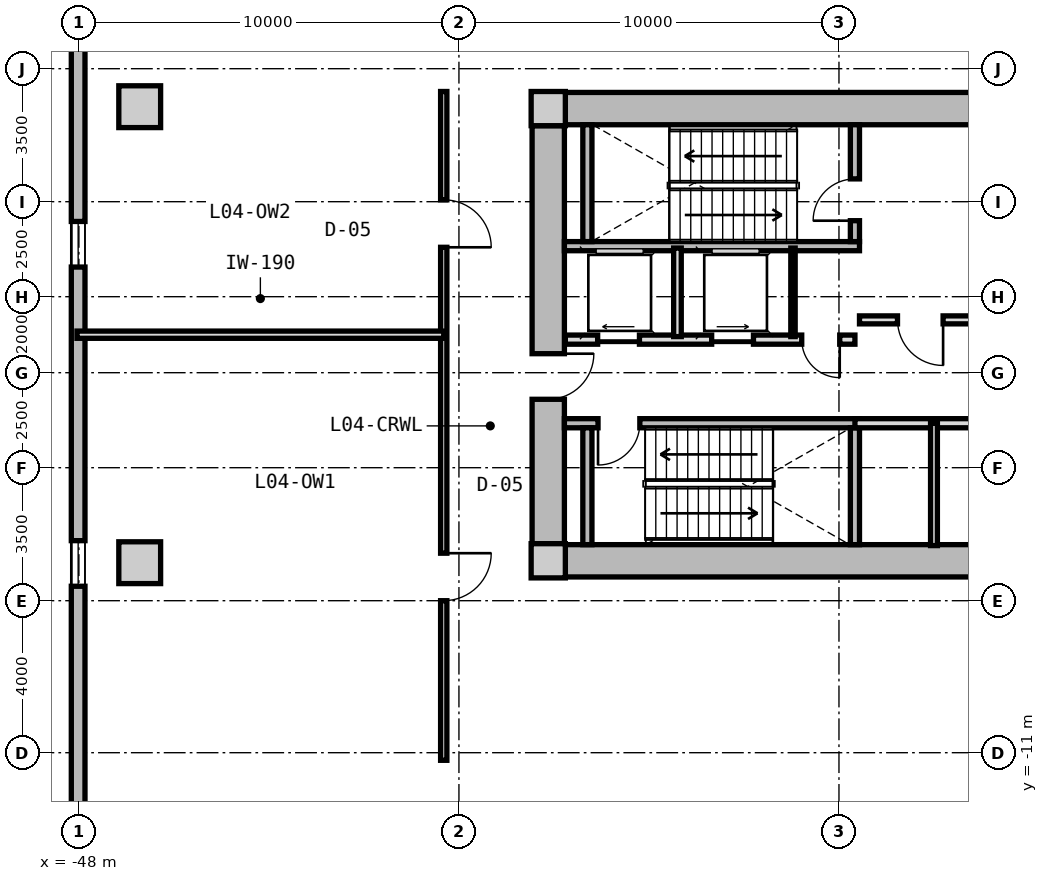
"""IFC4 building model, lengths in metres.
Left out: names, types, materials, properties, quantities, classifications, styles, units other than length and angle.
Written with IfcOpenShell. Run it as: python <this file> out.ifc"""

import sys

from ifc_helpers import new_model, si_unit, direction, frame, frame_2d, origin, origin_2d, place, context, subcontext, project, spatial, rectangle, extrude, source, transform, mapped, element, fill, save


model = new_model("IFC4")
c1 = context("Model", 3, precision=1e-05, world=origin(), true_north=direction((0.0, 1.0)))
c2 = subcontext(c1, "Body", "Model", "MODEL_VIEW")
j1 = project(units=[si_unit("LENGTHUNIT", "METRE"), si_unit("PLANEANGLEUNIT", "RADIAN")], contexts=[c1])
p1 = place(None, origin())
s1 = spatial("IfcSite", under=j1, at=p1, CompositionType="ELEMENT")
p2 = place(p1, origin())
s2 = spatial("IfcBuilding", under=s1, at=p2, CompositionType="ELEMENT")
p3 = place(p2, frame((0.0, 0.0, 16.8)))
s3 = spatial("IfcBuildingStorey", under=s2, at=p3, CompositionType="ELEMENT", Elevation=16.8)
m1 = source(origin(), c2, "Body", "SweptSolid", [
    extrude(rectangle(XDim=0.9, YDim=0.9, at=origin_2d()), origin(), (0.0, 0.0, 1.0), 4.8),
])
for number, where, z_axis, x_axis in (
    (1, (-35.65, -5.95, 0.0), (0.0, 0.0, 1.0), (1.0, 0.0, 0.0)),
    (2, (-35.65, 5.95, 0.0), (0.0, 0.0, 1.0), (1.0, 0.0, 0.0)),
):
    element("IfcColumn", number, at=place(p3, frame(where, z_axis=z_axis, x_axis=x_axis)), inside=s3, PredefinedType="COLUMN", context=c2, shape_type="MappedRepresentation", body=[
        mapped(m1, transform((0.0, 0.0, 0.0), x_axis=(1.0, 0.0, 0.0), y_axis=(0.0, 1.0, 0.0), z_axis=(0.0, 0.0, 1.0), scale=1.0)),
    ])
m2 = source(origin(), c2, "Body", "SweptSolid", [
    extrude(rectangle(XDim=14.4, YDim=0.85, at=frame_2d((7.2, 0.0))), origin(), (0.0, 0.0, 1.0), 4.38),
])
for number, where, z_axis, x_axis in (
    (3, (-35.2, 5.95, 0.0), (0.0, 0.0, 1.0), (1.0, 0.0, 0.0)),
    (4, (-20.8, -5.95, 0.0), (0.0, 0.0, 1.0), (-1.0, 0.0, 0.0)),
):
    element("IfcWall", number, at=place(p3, frame(where, z_axis=z_axis, x_axis=x_axis)), inside=s3, PredefinedType="SHEAR", context=c2, shape_type="MappedRepresentation", body=[
        mapped(m2, transform((0.0, 0.0, 0.0), x_axis=(1.0, 0.0, 0.0), y_axis=(0.0, 1.0, 0.0), z_axis=(0.0, 0.0, 1.0), scale=1.0)),
    ])
m3 = source(origin(), c2, "Body", "SweptSolid", [
    extrude(rectangle(XDim=11.0, YDim=0.85, at=frame_2d((5.5, 0.0))), origin(), (0.0, 0.0, 1.0), 4.38),
])
p4 = place(p3, frame((-35.65, -5.5, 0.0), z_axis=(0.0, 0.0, 1.0), x_axis=(0.0, 1.0, 0.0)))
e5 = element("IfcWall", 5, at=p4, inside=s3, PredefinedType="SHEAR", context=c2, shape_type="MappedRepresentation", body=[
    mapped(m3, transform((0.0, 0.0, 0.0), x_axis=(1.0, 0.0, 0.0), y_axis=(0.0, 1.0, 0.0), z_axis=(0.0, 0.0, 1.0), scale=1.0)),
])
p5 = place(p4, frame((3.8, 0.0, 0.0)))
e6 = element("IfcOpeningElement", 6, at=p5, cuts=e5, PredefinedType="OPENING", context=c2, shape_type="SweptSolid", body=[
    extrude(rectangle(XDim=1.2, YDim=2.15, at=frame_2d((0.6, 1.075))), frame((0.0, 0.435, 0.0), z_axis=(0.0, -1.0, 0.0), x_axis=(1.0, 0.0, 0.0)), (0.0, 0.0, 1.0), 0.87),
])
m4 = source(origin(), c2, "Body", "SweptSolid", [
    extrude(rectangle(XDim=1.1, YDim=1.1, at=origin_2d()), origin(), (0.0, 0.0, 1.0), 4.38),
])
for number, where, z_axis, x_axis in (
    (7, (-46.4, -6.0, 0.0), (0.0, 0.0, 1.0), (1.0, 0.0, 0.0)),
    (8, (-46.4, 6.0, 0.0), (0.0, 0.0, 1.0), (1.0, 0.0, 0.0)),
):
    element("IfcColumn", number, at=place(p3, frame(where, z_axis=z_axis, x_axis=x_axis)), inside=s3, PredefinedType="COLUMN", context=c2, shape_type="MappedRepresentation", body=[
        mapped(m4, transform((0.0, 0.0, 0.0), x_axis=(1.0, 0.0, 0.0), y_axis=(0.0, 1.0, 0.0), z_axis=(0.0, 0.0, 1.0), scale=1.0)),
    ])
m5 = source(origin(), c2, "Body", "SweptSolid", [
    extrude(rectangle(XDim=38.04, YDim=0.36, at=frame_2d((19.02, 0.0))), origin(), (0.0, 0.0, 1.0), 4.38),
])
p6 = place(p3, frame((-48.02, -19.02, 0.0), z_axis=(0.0, 0.0, 1.0), x_axis=(0.0, 1.0, 0.0)))
e9 = element("IfcWall", 9, at=p6, inside=s3, PredefinedType="SOLIDWALL", context=c2, shape_type="MappedRepresentation", body=[
    mapped(m5, transform((0.0, 0.0, 0.0), x_axis=(1.0, 0.0, 0.0), y_axis=(0.0, 1.0, 0.0), z_axis=(0.0, 0.0, 1.0), scale=1.0)),
])
p7 = place(p6, frame((12.4, 0.0, 0.85)))
e10 = element("IfcOpeningElement", 10, at=p7, cuts=e9, PredefinedType="OPENING", context=c2, shape_type="SweptSolid", body=[
    extrude(rectangle(XDim=1.2, YDim=1.5, at=frame_2d((0.6, 0.75))), frame((0.0, 0.19, 0.0), z_axis=(0.0, -1.0, 0.0), x_axis=(1.0, 0.0, 0.0)), (0.0, 0.0, 1.0), 0.38),
])
p8 = place(p6, frame((20.8, 0.0, 0.85)))
e11 = element("IfcOpeningElement", 11, at=p8, cuts=e9, PredefinedType="OPENING", context=c2, shape_type="SweptSolid", body=[
    extrude(rectangle(XDim=1.2, YDim=1.5, at=frame_2d((0.6, 0.75))), frame((0.0, 0.19, 0.0), z_axis=(0.0, -1.0, 0.0), x_axis=(1.0, 0.0, 0.0)), (0.0, 0.0, 1.0), 0.38),
])
m6 = source(origin(), c2, "Body", "SweptSolid", [
    extrude(rectangle(XDim=7.765, YDim=0.24, at=frame_2d((3.883, 0.0))), origin(), (0.0, 0.0, 1.0), 4.38),
])
p9 = place(p3, frame((-35.225, 2.33, 0.0), z_axis=(0.0, 0.0, 1.0), x_axis=(1.0, 0.0, 0.0)))
e12 = element("IfcWall", 12, at=p9, inside=s3, PredefinedType="PARTITIONING", context=c2, shape_type="MappedRepresentation", body=[
    mapped(m6, transform((0.0, 0.0, 0.0), x_axis=(1.0, 0.0, 0.0), y_axis=(0.0, 1.0, 0.0), z_axis=(0.0, 0.0, 1.0), scale=1.0)),
])
m7 = source(origin(), c2, "Body", "SweptSolid", [
    extrude(rectangle(XDim=3.075, YDim=0.24, at=frame_2d((1.538, 0.0))), origin(), (0.0, 0.0, 1.0), 4.38),
])
p10 = place(p3, frame((-34.62, 2.45, 0.0), z_axis=(0.0, 0.0, 1.0), x_axis=(0.0, 1.0, 0.0)))
e13 = element("IfcWall", 13, at=p10, inside=s3, PredefinedType="PARTITIONING", context=c2, shape_type="MappedRepresentation", body=[
    mapped(m7, transform((0.0, 0.0, 0.0), x_axis=(1.0, 0.0, 0.0), y_axis=(0.0, 1.0, 0.0), z_axis=(0.0, 0.0, 1.0), scale=1.0)),
])
p11 = place(p3, frame((-27.58, 2.45, 0.0), z_axis=(0.0, 0.0, 1.0), x_axis=(0.0, 1.0, 0.0)))
e14 = element("IfcWall", 14, at=p11, inside=s3, PredefinedType="PARTITIONING", context=c2, shape_type="MappedRepresentation", body=[
    mapped(m7, transform((0.0, 0.0, 0.0), x_axis=(1.0, 0.0, 0.0), y_axis=(0.0, 1.0, 0.0), z_axis=(0.0, 0.0, 1.0), scale=1.0)),
])
p12 = place(p11, frame((0.55, 0.0, 0.0)))
e15 = element("IfcOpeningElement", 15, at=p12, cuts=e14, PredefinedType="OPENING", context=c2, shape_type="SweptSolid", body=[
    extrude(rectangle(XDim=1.1, YDim=2.15, at=frame_2d((0.55, 1.075))), frame((0.0, 0.13, 0.0), z_axis=(0.0, -1.0, 0.0), x_axis=(1.0, 0.0, 0.0)), (0.0, 0.0, 1.0), 0.26),
])
p13 = place(p3, frame((-35.225, -2.33, 0.0), z_axis=(0.0, 0.0, 1.0), x_axis=(1.0, 0.0, 0.0)))
e16 = element("IfcWall", 16, at=p13, inside=s3, PredefinedType="PARTITIONING", context=c2, shape_type="MappedRepresentation", body=[
    mapped(m6, transform((0.0, 0.0, 0.0), x_axis=(1.0, 0.0, 0.0), y_axis=(0.0, 1.0, 0.0), z_axis=(0.0, 0.0, 1.0), scale=1.0)),
])
p14 = place(p13, frame((0.885, 0.0, 0.0)))
e17 = element("IfcOpeningElement", 17, at=p14, cuts=e16, PredefinedType="OPENING", context=c2, shape_type="SweptSolid", body=[
    extrude(rectangle(XDim=1.1, YDim=2.15, at=frame_2d((0.55, 1.075))), frame((0.0, 0.13, 0.0), z_axis=(0.0, -1.0, 0.0), x_axis=(1.0, 0.0, 0.0)), (0.0, 0.0, 1.0), 0.26),
])
for number, where, z_axis, x_axis in (
    (18, (-34.62, -5.525, 0.0), (0.0, 0.0, 1.0), (0.0, 1.0, 0.0)),
    (19, (-27.58, -5.525, 0.0), (0.0, 0.0, 1.0), (0.0, 1.0, 0.0)),
):
    element("IfcWall", number, at=place(p3, frame(where, z_axis=z_axis, x_axis=x_axis)), inside=s3, PredefinedType="PARTITIONING", context=c2, shape_type="MappedRepresentation", body=[
        mapped(m7, transform((0.0, 0.0, 0.0), x_axis=(1.0, 0.0, 0.0), y_axis=(0.0, 1.0, 0.0), z_axis=(0.0, 0.0, 1.0), scale=1.0)),
    ])
m8 = source(origin(), c2, "Body", "SweptSolid", [
    extrude(rectangle(XDim=6.66, YDim=0.21, at=frame_2d((3.33, 0.0))), origin(), (0.0, 0.0, 1.0), 4.365),
])
p15 = place(p3, frame((-27.46, 0.39, 0.0), z_axis=(0.0, 0.0, 1.0), x_axis=(1.0, 0.0, 0.0)))
e20 = element("IfcWall", 20, at=p15, inside=s3, PredefinedType="PARTITIONING", context=c2, shape_type="MappedRepresentation", body=[
    mapped(m8, transform((0.0, 0.0, 0.0), x_axis=(1.0, 0.0, 0.0), y_axis=(0.0, 1.0, 0.0), z_axis=(0.0, 0.0, 1.0), scale=1.0)),
])
p16 = place(p15, frame((1.0, 0.0, 0.0)))
e21 = element("IfcOpeningElement", 21, at=p16, cuts=e20, PredefinedType="OPENING", context=c2, shape_type="SweptSolid", body=[
    extrude(rectangle(XDim=1.2, YDim=2.15, at=frame_2d((0.6, 1.075))), frame((0.0, 0.115, 0.0), z_axis=(0.0, -1.0, 0.0), x_axis=(1.0, 0.0, 0.0)), (0.0, 0.0, 1.0), 0.23),
])
m9 = source(origin(), c2, "Body", "SweptSolid", [
    extrude(rectangle(XDim=7.62, YDim=0.24, at=frame_2d((3.81, 0.0))), origin(), (0.0, 0.0, 1.0), 4.365),
])
p17 = place(p3, frame((-35.2, -0.13, 0.0), z_axis=(0.0, 0.0, 1.0), x_axis=(1.0, 0.0, 0.0)))
e22 = element("IfcWall", 22, at=p17, inside=s3, PredefinedType="PARTITIONING", context=c2, shape_type="MappedRepresentation", body=[
    mapped(m9, transform((0.0, 0.0, 0.0), x_axis=(1.0, 0.0, 0.0), y_axis=(0.0, 1.0, 0.0), z_axis=(0.0, 0.0, 1.0), scale=1.0)),
])
p18 = place(p17, frame((6.22, 0.0, 0.0)))
e23 = element("IfcOpeningElement", 23, at=p18, cuts=e22, PredefinedType="OPENING", context=c2, shape_type="SweptSolid", body=[
    extrude(rectangle(XDim=1.0, YDim=2.1, at=frame_2d((0.5, 1.05))), frame((0.0, 0.13, 0.0), z_axis=(0.0, -1.0, 0.0), x_axis=(1.0, 0.0, 0.0)), (0.0, 0.0, 1.0), 0.26),
])
p19 = place(p17, frame((0.85, 0.0, 0.0)))
e24 = element("IfcOpeningElement", 24, at=p19, cuts=e22, PredefinedType="OPENING", context=c2, shape_type="SweptSolid", body=[
    extrude(rectangle(XDim=1.1, YDim=2.2, at=frame_2d((0.55, 1.1))), frame((0.0, 0.13, 0.0), z_axis=(0.0, -1.0, 0.0), x_axis=(1.0, 0.0, 0.0)), (0.0, 0.0, 1.0), 0.26),
])
p20 = place(p17, frame((3.85, 0.0, 0.0)))
e25 = element("IfcOpeningElement", 25, at=p20, cuts=e22, PredefinedType="OPENING", context=c2, shape_type="SweptSolid", body=[
    extrude(rectangle(XDim=1.1, YDim=2.2, at=frame_2d((0.55, 1.1))), frame((0.0, 0.13, 0.0), z_axis=(0.0, -1.0, 0.0), x_axis=(1.0, 0.0, 0.0)), (0.0, 0.0, 1.0), 0.26),
])
m10 = source(origin(), c2, "Body", "SweptSolid", [
    extrude(rectangle(XDim=2.33, YDim=0.115, at=frame_2d((1.165, 0.0))), origin(), (0.0, 0.0, 1.0), 4.365),
])
p21 = place(p3, frame((-29.21, -0.05, 0.0), z_axis=(0.0, 0.0, 1.0), x_axis=(0.0, 1.0, 0.0)))
e26 = element("IfcWall", 26, at=p21, inside=s3, PredefinedType="PARTITIONING", context=c2, shape_type="MappedRepresentation", body=[
    mapped(m10, transform((0.0, 0.0, 0.0), x_axis=(1.0, 0.0, 0.0), y_axis=(0.0, 1.0, 0.0), z_axis=(0.0, 0.0, 1.0), scale=1.0)),
])
m11 = source(origin(), c2, "Body", "SweptSolid", [
    extrude(rectangle(XDim=2.33, YDim=0.2, at=frame_2d((1.165, 0.0))), origin(), (0.0, 0.0, 1.0), 4.365),
])
p22 = place(p3, frame((-32.25, -0.05, 0.0), z_axis=(0.0, 0.0, 1.0), x_axis=(0.0, 1.0, 0.0)))
e27 = element("IfcWall", 27, at=p22, inside=s3, PredefinedType="PARTITIONING", context=c2, shape_type="MappedRepresentation", body=[
    mapped(m11, transform((0.0, 0.0, 0.0), x_axis=(1.0, 0.0, 0.0), y_axis=(0.0, 1.0, 0.0), z_axis=(0.0, 0.0, 1.0), scale=1.0)),
])
m12 = source(origin(), c2, "Body", "SweptSolid", [
    extrude(rectangle(XDim=4.13, YDim=0.24, at=frame_2d((2.065, 0.0))), origin(), (0.0, 0.0, 1.0), 4.365),
])
p23 = place(p3, frame((-27.58, -2.33, 0.0), z_axis=(0.0, 0.0, 1.0), x_axis=(1.0, 0.0, 0.0)))
e28 = element("IfcWall", 28, at=p23, inside=s3, PredefinedType="PARTITIONING", context=c2, shape_type="MappedRepresentation", body=[
    mapped(m12, transform((0.0, 0.0, 0.0), x_axis=(1.0, 0.0, 0.0), y_axis=(0.0, 1.0, 0.0), z_axis=(0.0, 0.0, 1.0), scale=1.0)),
])
m13 = source(origin(), c2, "Body", "SweptSolid", [
    extrude(rectangle(XDim=3.22, YDim=0.18, at=frame_2d((1.61, 0.0))), origin(), (0.0, 0.0, 1.0), 4.365),
])
p24 = place(p3, frame((-25.5, -5.55, 0.0), z_axis=(0.0, 0.0, 1.0), x_axis=(0.0, 1.0, 0.0)))
e29 = element("IfcWall", 29, at=p24, inside=s3, PredefinedType="PARTITIONING", context=c2, shape_type="MappedRepresentation", body=[
    mapped(m13, transform((0.0, 0.0, 0.0), x_axis=(1.0, 0.0, 0.0), y_axis=(0.0, 1.0, 0.0), z_axis=(0.0, 0.0, 1.0), scale=1.0)),
])
m14 = source(origin(), c2, "Body", "SweptSolid", [
    extrude(rectangle(XDim=17.6, YDim=0.165, at=frame_2d((8.8, 0.0))), origin(), (0.0, 0.0, 1.0), 4.365),
])
p25 = place(p3, frame((-38.4, -11.2, 0.0), z_axis=(0.0, 0.0, 1.0), x_axis=(0.0, 1.0, 0.0)))
e30 = element("IfcWall", 30, at=p25, inside=s3, PredefinedType="PARTITIONING", context=c2, shape_type="MappedRepresentation", body=[
    mapped(m14, transform((0.0, 0.0, 0.0), x_axis=(1.0, 0.0, 0.0), y_axis=(0.0, 1.0, 0.0), z_axis=(0.0, 0.0, 1.0), scale=1.0)),
])
p26 = place(p25, frame((4.2, 0.0, 0.0)))
e31 = element("IfcOpeningElement", 31, at=p26, cuts=e30, PredefinedType="OPENING", context=c2, shape_type="SweptSolid", body=[
    extrude(rectangle(XDim=1.25, YDim=2.2, at=frame_2d((0.625, 1.1))), frame((0.0, 0.093, 0.0), z_axis=(0.0, -1.0, 0.0), x_axis=(1.0, 0.0, 0.0)), (0.0, 0.0, 1.0), 0.185),
])
p27 = place(p25, frame((13.5, 0.0, 0.0)))
e32 = element("IfcOpeningElement", 32, at=p27, cuts=e30, PredefinedType="OPENING", context=c2, shape_type="SweptSolid", body=[
    extrude(rectangle(XDim=1.25, YDim=2.2, at=frame_2d((0.625, 1.1))), frame((0.0, 0.093, 0.0), z_axis=(0.0, -1.0, 0.0), x_axis=(1.0, 0.0, 0.0)), (0.0, 0.0, 1.0), 0.185),
])
m15 = source(origin(), c2, "Body", "SweptSolid", [
    extrude(rectangle(XDim=9.65, YDim=0.19, at=frame_2d((4.825, 0.0))), origin(), (0.0, 0.0, 1.0), 4.365),
])
p28 = place(p3, frame((-48.05, 0.0, 0.0), z_axis=(0.0, 0.0, 1.0), x_axis=(1.0, 0.0, 0.0)))
e33 = element("IfcWall", 33, at=p28, inside=s3, PredefinedType="PARTITIONING", context=c2, shape_type="MappedRepresentation", body=[
    mapped(m15, transform((0.0, 0.0, 0.0), x_axis=(1.0, 0.0, 0.0), y_axis=(0.0, 1.0, 0.0), z_axis=(0.0, 0.0, 1.0), scale=1.0)),
])
m16 = source(origin(), c2, "Body", "SweptSolid", [
    extrude(rectangle(XDim=1.2, YDim=1.5, at=frame_2d((0.6, 0.75))), frame((0.0, 0.03, 0.0), z_axis=(0.0, -1.0, 0.0), x_axis=(1.0, 0.0, 0.0)), (0.0, 0.0, 1.0), 0.06),
])
p29 = place(p7, origin())
e34 = element("IfcWindow", 34, at=p29, inside=s3, PartitioningType="SINGLE_PANEL", PredefinedType="WINDOW", context=c2, shape_type="MappedRepresentation", body=[
    mapped(m16, transform((0.0, 0.0, 0.0), x_axis=(1.0, 0.0, 0.0), y_axis=(0.0, 1.0, 0.0), z_axis=(0.0, 0.0, 1.0), scale=1.0)),
])
fill(e10, e34)
p30 = place(p8, origin())
e35 = element("IfcWindow", 35, at=p30, inside=s3, PartitioningType="SINGLE_PANEL", PredefinedType="WINDOW", context=c2, shape_type="MappedRepresentation", body=[
    mapped(m16, transform((0.0, 0.0, 0.0), x_axis=(1.0, 0.0, 0.0), y_axis=(0.0, 1.0, 0.0), z_axis=(0.0, 0.0, 1.0), scale=1.0)),
])
fill(e11, e35)
m17 = source(origin(), c2, "Body", "SweptSolid", [
    extrude(rectangle(XDim=1.1, YDim=2.15, at=frame_2d((0.55, 1.075))), frame((0.0, 0.025, 0.0), z_axis=(0.0, -1.0, 0.0), x_axis=(1.0, 0.0, 0.0)), (0.0, 0.0, 1.0), 0.05),
])
p31 = place(p12, origin())
e36 = element("IfcDoor", 36, at=p31, inside=s3, OperationType="SINGLE_SWING_LEFT", PredefinedType="DOOR", context=c2, shape_type="MappedRepresentation", body=[
    mapped(m17, transform((0.0, 0.0, 0.0), x_axis=(1.0, 0.0, 0.0), y_axis=(0.0, 1.0, 0.0), z_axis=(0.0, 0.0, 1.0), scale=1.0)),
])
fill(e15, e36)
p32 = place(p14, frame((1.1, 0.0, 0.0), z_axis=(0.0, 0.0, 1.0), x_axis=(-1.0, 0.0, 0.0)))
e37 = element("IfcDoor", 37, at=p32, inside=s3, OperationType="SINGLE_SWING_RIGHT", PredefinedType="DOOR", context=c2, shape_type="MappedRepresentation", body=[
    mapped(m17, transform((0.0, 0.0, 0.0), x_axis=(1.0, 0.0, 0.0), y_axis=(0.0, 1.0, 0.0), z_axis=(0.0, 0.0, 1.0), scale=1.0)),
])
fill(e17, e37)
m18 = source(origin(), c2, "Body", "SweptSolid", [
    extrude(rectangle(XDim=1.2, YDim=2.15, at=frame_2d((0.6, 1.075))), frame((0.0, 0.025, 0.0), z_axis=(0.0, -1.0, 0.0), x_axis=(1.0, 0.0, 0.0)), (0.0, 0.0, 1.0), 0.05),
])
p33 = place(p16, frame((1.2, 0.0, 0.0), z_axis=(0.0, 0.0, 1.0), x_axis=(-1.0, 0.0, 0.0)))
e38 = element("IfcDoor", 38, at=p33, inside=s3, OperationType="SINGLE_SWING_LEFT", PredefinedType="DOOR", context=c2, shape_type="MappedRepresentation", body=[
    mapped(m18, transform((0.0, 0.0, 0.0), x_axis=(1.0, 0.0, 0.0), y_axis=(0.0, 1.0, 0.0), z_axis=(0.0, 0.0, 1.0), scale=1.0)),
])
fill(e21, e38)
p34 = place(p5, frame((1.2, 0.0, 0.0), z_axis=(0.0, 0.0, 1.0), x_axis=(-1.0, 0.0, 0.0)))
e39 = element("IfcDoor", 39, at=p34, inside=s3, OperationType="SINGLE_SWING_LEFT", PredefinedType="DOOR", context=c2, shape_type="MappedRepresentation", body=[
    mapped(m18, transform((0.0, 0.0, 0.0), x_axis=(1.0, 0.0, 0.0), y_axis=(0.0, 1.0, 0.0), z_axis=(0.0, 0.0, 1.0), scale=1.0)),
])
fill(e6, e39)
m19 = source(origin(), c2, "Body", "SweptSolid", [
    extrude(rectangle(XDim=1.0, YDim=2.1, at=frame_2d((0.5, 1.05))), frame((0.0, 0.025, 0.0), z_axis=(0.0, -1.0, 0.0), x_axis=(1.0, 0.0, 0.0)), (0.0, 0.0, 1.0), 0.05),
])
p35 = place(p18, frame((1.0, 0.0, 0.0), z_axis=(0.0, 0.0, 1.0), x_axis=(-1.0, 0.0, 0.0)))
e40 = element("IfcDoor", 40, at=p35, inside=s3, OperationType="SINGLE_SWING_LEFT", PredefinedType="DOOR", context=c2, shape_type="MappedRepresentation", body=[
    mapped(m19, transform((0.0, 0.0, 0.0), x_axis=(1.0, 0.0, 0.0), y_axis=(0.0, 1.0, 0.0), z_axis=(0.0, 0.0, 1.0), scale=1.0)),
])
fill(e23, e40)
m20 = source(origin(), c2, "Body", "SweptSolid", [
    extrude(rectangle(XDim=1.1, YDim=2.2, at=frame_2d((0.55, 1.1))), frame((0.0, 0.025, 0.0), z_axis=(0.0, -1.0, 0.0), x_axis=(1.0, 0.0, 0.0)), (0.0, 0.0, 1.0), 0.05),
])
p36 = place(p19, origin())
e41 = element("IfcDoor", 41, at=p36, inside=s3, OperationType="SLIDING_TO_LEFT", PredefinedType="DOOR", context=c2, shape_type="MappedRepresentation", body=[
    mapped(m20, transform((0.0, 0.0, 0.0), x_axis=(1.0, 0.0, 0.0), y_axis=(0.0, 1.0, 0.0), z_axis=(0.0, 0.0, 1.0), scale=1.0)),
])
fill(e24, e41)
p37 = place(p20, origin())
e42 = element("IfcDoor", 42, at=p37, inside=s3, OperationType="SLIDING_TO_RIGHT", PredefinedType="DOOR", context=c2, shape_type="MappedRepresentation", body=[
    mapped(m20, transform((0.0, 0.0, 0.0), x_axis=(1.0, 0.0, 0.0), y_axis=(0.0, 1.0, 0.0), z_axis=(0.0, 0.0, 1.0), scale=1.0)),
])
fill(e25, e42)
m21 = source(origin(), c2, "Body", "SweptSolid", [
    extrude(rectangle(XDim=1.25, YDim=2.2, at=frame_2d((0.625, 1.1))), frame((0.0, 0.025, 0.0), z_axis=(0.0, -1.0, 0.0), x_axis=(1.0, 0.0, 0.0)), (0.0, 0.0, 1.0), 0.05),
])
p38 = place(p26, frame((1.25, 0.0, 0.0), z_axis=(0.0, 0.0, 1.0), x_axis=(-1.0, 0.0, 0.0)))
e43 = element("IfcDoor", 43, at=p38, inside=s3, OperationType="SINGLE_SWING_LEFT", PredefinedType="DOOR", context=c2, shape_type="MappedRepresentation", body=[
    mapped(m21, transform((0.0, 0.0, 0.0), x_axis=(1.0, 0.0, 0.0), y_axis=(0.0, 1.0, 0.0), z_axis=(0.0, 0.0, 1.0), scale=1.0)),
])
fill(e31, e43)
p39 = place(p27, frame((1.25, 0.0, 0.0), z_axis=(0.0, 0.0, 1.0), x_axis=(-1.0, 0.0, 0.0)))
e44 = element("IfcDoor", 44, at=p39, inside=s3, OperationType="SINGLE_SWING_RIGHT", PredefinedType="DOOR", context=c2, shape_type="MappedRepresentation", body=[
    mapped(m21, transform((0.0, 0.0, 0.0), x_axis=(1.0, 0.0, 0.0), y_axis=(0.0, 1.0, 0.0), z_axis=(0.0, 0.0, 1.0), scale=1.0)),
])
fill(e32, e44)
save(model, sys.argv[1])
